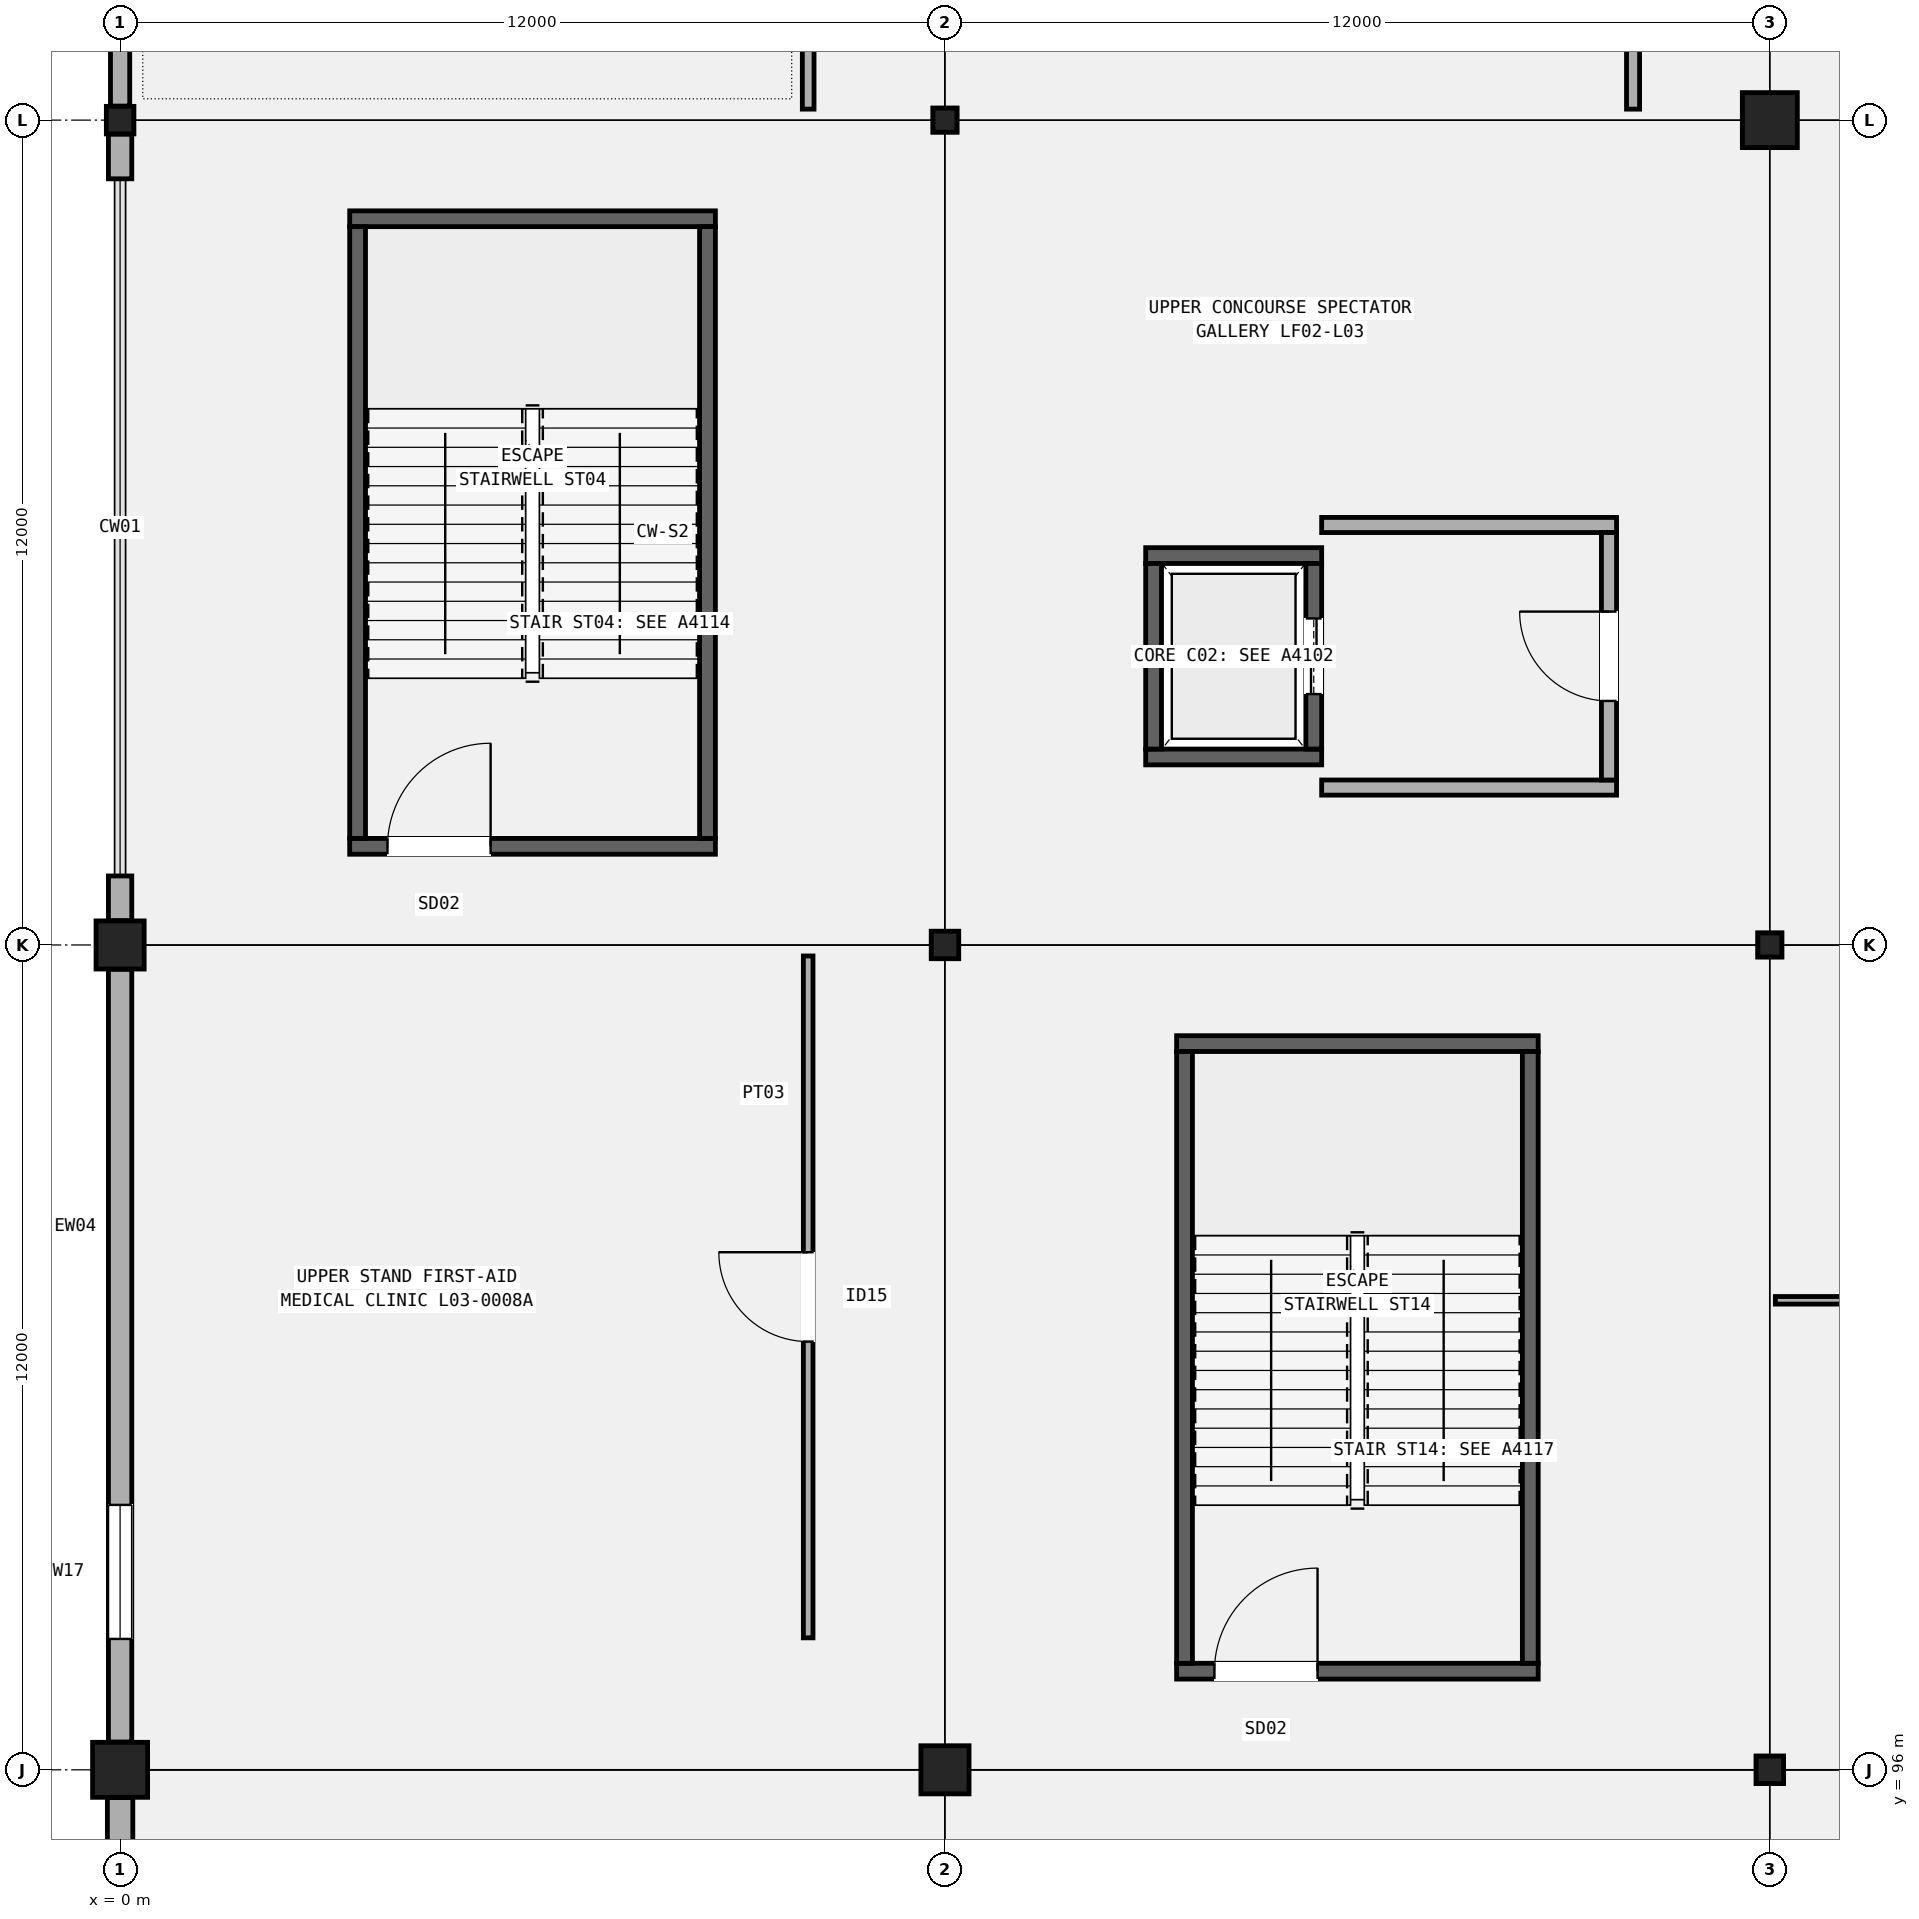
"""IFC4 building model, lengths in metres.
Left out: names, types, materials, properties, quantities, classifications, styles, units other than length and angle.
Written with IfcOpenShell. Run it as: python <this file> out.ifc"""

import sys

from ifc_helpers import new_model, si_unit, direction, frame, frame_2d, origin, origin_2d, place, context, subcontext, project, spatial, rectangle, hollow_rectangle, extrude, element, fill, save


model = new_model("IFC4")
c1 = context("Model", 3, precision=1e-05, world=origin(), true_north=direction((0.0, 1.0)))
c2 = subcontext(c1, "Body", "Model", "MODEL_VIEW")
j1 = project(units=[si_unit("LENGTHUNIT", "METRE"), si_unit("PLANEANGLEUNIT", "RADIAN")], contexts=[c1])
p1 = place(None, origin())
s1 = spatial("IfcSite", under=j1, at=p1, CompositionType="ELEMENT")
p2 = place(p1, origin())
s2 = spatial("IfcBuilding", under=s1, at=p2, CompositionType="ELEMENT")
p3 = place(p2, frame((0.0, 0.0, 15.3)))
s3 = spatial("IfcBuildingStorey", under=s2, at=p3, CompositionType="ELEMENT", Elevation=15.3)
p4 = place(p3, frame((0.0, 96.0, 0.0), z_axis=(0.0, 0.0, 1.0), x_axis=(1.0, 0.0, 0.0)))
e1 = element("IfcColumn", 1, at=p4, inside=s3, PredefinedType="COLUMN", context=c2, shape_type="SweptSolid", body=[
    extrude(rectangle(XDim=0.8, YDim=0.8, at=origin_2d()), origin(), (0.0, 0.0, 1.0), 5.1),
])
p5 = place(p3, frame((0.0, 108.0, 0.0), z_axis=(0.0, 0.0, 1.0), x_axis=(1.0, 0.0, 0.0)))
e2 = element("IfcColumn", 2, at=p5, inside=s3, PredefinedType="COLUMN", context=c2, shape_type="SweptSolid", body=[
    extrude(rectangle(XDim=0.7, YDim=0.7, at=origin_2d()), origin(), (0.0, 0.0, 1.0), 5.1),
])
p6 = place(p3, frame((0.0, 120.0, 0.0), z_axis=(0.0, 0.0, 1.0), x_axis=(1.0, 0.0, 0.0)))
e3 = element("IfcColumn", 3, at=p6, inside=s3, PredefinedType="COLUMN", context=c2, shape_type="SweptSolid", body=[
    extrude(hollow_rectangle(XDim=0.4, YDim=0.4, WallThickness=0.016, InnerFilletRadius=0.016, OuterFilletRadius=0.032, at=origin_2d()), origin(), (0.0, 0.0, 1.0), 5.1),
])
p7 = place(p3, frame((12.0, 96.0, 0.0), z_axis=(0.0, 0.0, 1.0), x_axis=(1.0, 0.0, 0.0)))
e4 = element("IfcColumn", 4, at=p7, inside=s3, PredefinedType="COLUMN", context=c2, shape_type="SweptSolid", body=[
    extrude(rectangle(XDim=0.7, YDim=0.7, at=origin_2d()), origin(), (0.0, 0.0, 1.0), 5.1),
])
p8 = place(p3, frame((12.0, 108.0, 0.0), z_axis=(0.0, 0.0, 1.0), x_axis=(1.0, 0.0, 0.0)))
e5 = element("IfcColumn", 5, at=p8, inside=s3, PredefinedType="COLUMN", context=c2, shape_type="SweptSolid", body=[
    extrude(hollow_rectangle(XDim=0.4, YDim=0.4, WallThickness=0.016, InnerFilletRadius=0.016, OuterFilletRadius=0.032, at=origin_2d()), origin(), (0.0, 0.0, 1.0), 5.1),
])
p9 = place(p3, frame((12.0, 120.0, 0.0), z_axis=(0.0, 0.0, 1.0), x_axis=(1.0, 0.0, 0.0)))
e6 = element("IfcColumn", 6, at=p9, inside=s3, PredefinedType="COLUMN", context=c2, shape_type="SweptSolid", body=[
    extrude(hollow_rectangle(XDim=0.35, YDim=0.35, WallThickness=0.016, InnerFilletRadius=0.016, OuterFilletRadius=0.032, at=origin_2d()), origin(), (0.0, 0.0, 1.0), 5.1),
])
p10 = place(p3, frame((24.0, 96.0, 0.0), z_axis=(0.0, 0.0, 1.0), x_axis=(1.0, 0.0, 0.0)))
e7 = element("IfcColumn", 7, at=p10, inside=s3, PredefinedType="COLUMN", context=c2, shape_type="SweptSolid", body=[
    extrude(hollow_rectangle(XDim=0.4, YDim=0.4, WallThickness=0.016, InnerFilletRadius=0.016, OuterFilletRadius=0.032, at=origin_2d()), origin(), (0.0, 0.0, 1.0), 5.1),
])
p11 = place(p3, frame((24.0, 108.0, 0.0), z_axis=(0.0, 0.0, 1.0), x_axis=(1.0, 0.0, 0.0)))
e8 = element("IfcColumn", 8, at=p11, inside=s3, PredefinedType="COLUMN", context=c2, shape_type="SweptSolid", body=[
    extrude(hollow_rectangle(XDim=0.35, YDim=0.35, WallThickness=0.016, InnerFilletRadius=0.016, OuterFilletRadius=0.032, at=origin_2d()), origin(), (0.0, 0.0, 1.0), 5.1),
])
p12 = place(p3, frame((24.0, 120.0, 0.0), z_axis=(0.0, 0.0, 1.0), x_axis=(1.0, 0.0, 0.0)))
e9 = element("IfcColumn", 9, at=p12, inside=s3, PredefinedType="COLUMN", context=c2, shape_type="SweptSolid", body=[
    extrude(rectangle(XDim=0.8, YDim=0.8, at=origin_2d()), origin(), (0.0, 0.0, 1.0), 5.1),
])
p13 = place(p3, frame((0.0, 84.179, 0.0), z_axis=(0.0, 0.0, 1.0), x_axis=(0.0, 1.0, 0.0)))
e10 = element("IfcWall", 10, at=p13, inside=s3, PredefinedType="SOLIDWALL", context=c2, shape_type="SweptSolid", body=[
    extrude(rectangle(XDim=11.417, YDim=0.37, at=frame_2d((5.708, 0.0))), origin(), (0.0, 0.0, 1.0), 4.16),
])
p14 = place(p13, frame((2.75, 0.0, 0.95)))
e11 = element("IfcOpeningElement", 11, at=p14, cuts=e10, PredefinedType="OPENING", context=c2, shape_type="SweptSolid", body=[
    extrude(rectangle(XDim=1.95, YDim=1.9, at=frame_2d((0.975, 0.95))), frame((0.0, 0.195, 0.0), z_axis=(0.0, -1.0, 0.0), x_axis=(1.0, 0.0, 0.0)), (0.0, 0.0, 1.0), 0.39),
])
p15 = place(p3, frame((0.0, 96.404, 0.0), z_axis=(0.0, 0.0, 1.0), x_axis=(0.0, 1.0, 0.0)))
e12 = element("IfcWall", 12, at=p15, inside=s3, PredefinedType="SOLIDWALL", context=c2, shape_type="SweptSolid", body=[
    extrude(rectangle(XDim=11.242, YDim=0.34, at=frame_2d((5.621, 0.0))), origin(), (0.0, 0.0, 1.0), 4.172),
])
p16 = place(p15, frame((1.5, 0.0, 0.95)))
e13 = element("IfcOpeningElement", 13, at=p16, cuts=e12, PredefinedType="OPENING", context=c2, shape_type="SweptSolid", body=[
    extrude(rectangle(XDim=1.95, YDim=2.35, at=frame_2d((0.975, 1.175))), frame((0.0, 0.18, 0.0), z_axis=(0.0, -1.0, 0.0), x_axis=(1.0, 0.0, 0.0)), (0.0, 0.0, 1.0), 0.36),
])
for number, where, z_axis, x_axis in (
    (14, (0.0, 108.354, 0.0), (0.0, 0.0, 1.0), (0.0, 1.0, 0.0)),
    (15, (0.0, 119.146, 0.0), (0.0, 0.0, 1.0), (0.0, 1.0, 0.0)),
):
    element("IfcWall", number, at=place(p3, frame(where, z_axis=z_axis, x_axis=x_axis)), inside=s3, PredefinedType="SOLIDWALL", context=c2, shape_type="SweptSolid", body=[
        extrude(rectangle(XDim=0.65, YDim=0.34, at=frame_2d((0.325, 0.0))), origin(), (0.0, 0.0, 1.0), 4.06),
    ])
p17 = place(p3, frame((0.0, 120.204, 0.0), z_axis=(0.0, 0.0, 1.0), x_axis=(0.0, 1.0, 0.0)))
e16 = element("IfcWall", 16, at=p17, inside=s3, PredefinedType="SOLIDWALL", context=c2, shape_type="SweptSolid", body=[
    extrude(rectangle(XDim=11.617, YDim=0.28, at=frame_2d((5.809, 0.0))), origin(), (0.0, 0.0, 1.0), 4.16),
])
p18 = place(p17, frame((1.5, 0.0, 0.95)))
e17 = element("IfcOpeningElement", 17, at=p18, cuts=e16, PredefinedType="OPENING", context=c2, shape_type="SweptSolid", body=[
    extrude(rectangle(XDim=2.1, YDim=1.85, at=frame_2d((1.05, 0.925))), frame((0.0, 0.15, 0.0), z_axis=(0.0, -1.0, 0.0), x_axis=(1.0, 0.0, 0.0)), (0.0, 0.0, 1.0), 0.3),
])
p19 = place(p3, frame((3.34, 109.435, 0.0), z_axis=(0.0, 0.0, 1.0), x_axis=(1.0, 0.0, 0.0)))
e18 = element("IfcWall", 18, at=p19, inside=s3, PredefinedType="SHEAR", context=c2, shape_type="SweptSolid", body=[
    extrude(rectangle(XDim=5.32, YDim=0.23, at=frame_2d((2.66, 0.0))), origin(), (0.0, 0.0, 1.0), 4.86),
])
p20 = place(p19, frame((0.55, 0.0, 0.0)))
e19 = element("IfcOpeningElement", 19, at=p20, cuts=e18, PredefinedType="OPENING", context=c2, shape_type="SweptSolid", body=[
    extrude(rectangle(XDim=1.5, YDim=2.2, at=frame_2d((0.75, 1.1))), frame((0.0, 0.125, 0.0), z_axis=(0.0, -1.0, 0.0), x_axis=(1.0, 0.0, 0.0)), (0.0, 0.0, 1.0), 0.25),
])
p21 = place(p3, frame((3.34, 118.565, 0.0), z_axis=(0.0, 0.0, 1.0), x_axis=(1.0, 0.0, 0.0)))
e20 = element("IfcWall", 20, at=p21, inside=s3, PredefinedType="SHEAR", context=c2, shape_type="SweptSolid", body=[
    extrude(rectangle(XDim=5.32, YDim=0.23, at=frame_2d((2.66, 0.0))), origin(), (0.0, 0.0, 1.0), 4.86),
])
for number, where, z_axis, x_axis in (
    (21, (3.455, 109.55, 0.0), (0.0, 0.0, 1.0), (0.0, 1.0, 0.0)),
    (22, (8.545, 109.55, 0.0), (0.0, 0.0, 1.0), (0.0, 1.0, 0.0)),
):
    element("IfcWall", number, at=place(p3, frame(where, z_axis=z_axis, x_axis=x_axis)), inside=s3, PredefinedType="SHEAR", context=c2, shape_type="SweptSolid", body=[
        extrude(rectangle(XDim=8.9, YDim=0.23, at=frame_2d((4.45, 0.0))), origin(), (0.0, 0.0, 1.0), 4.86),
    ])
p22 = place(p3, frame((15.37, 97.435, 0.0), z_axis=(0.0, 0.0, 1.0), x_axis=(1.0, 0.0, 0.0)))
e23 = element("IfcWall", 23, at=p22, inside=s3, PredefinedType="SHEAR", context=c2, shape_type="SweptSolid", body=[
    extrude(rectangle(XDim=5.26, YDim=0.23, at=frame_2d((2.63, 0.0))), origin(), (0.0, 0.0, 1.0), 4.86),
])
p23 = place(p22, frame((0.55, 0.0, 0.0)))
e24 = element("IfcOpeningElement", 24, at=p23, cuts=e23, PredefinedType="OPENING", context=c2, shape_type="SweptSolid", body=[
    extrude(rectangle(XDim=1.5, YDim=2.2, at=frame_2d((0.75, 1.1))), frame((0.0, 0.125, 0.0), z_axis=(0.0, -1.0, 0.0), x_axis=(1.0, 0.0, 0.0)), (0.0, 0.0, 1.0), 0.25),
])
p24 = place(p3, frame((15.37, 106.565, 0.0), z_axis=(0.0, 0.0, 1.0), x_axis=(1.0, 0.0, 0.0)))
e25 = element("IfcWall", 25, at=p24, inside=s3, PredefinedType="SHEAR", context=c2, shape_type="SweptSolid", body=[
    extrude(rectangle(XDim=5.26, YDim=0.23, at=frame_2d((2.63, 0.0))), origin(), (0.0, 0.0, 1.0), 4.86),
])
for number, where, z_axis, x_axis in (
    (26, (15.485, 97.55, 0.0), (0.0, 0.0, 1.0), (0.0, 1.0, 0.0)),
    (27, (20.515, 97.55, 0.0), (0.0, 0.0, 1.0), (0.0, 1.0, 0.0)),
):
    element("IfcWall", number, at=place(p3, frame(where, z_axis=z_axis, x_axis=x_axis)), inside=s3, PredefinedType="SHEAR", context=c2, shape_type="SweptSolid", body=[
        extrude(rectangle(XDim=8.9, YDim=0.23, at=frame_2d((4.45, 0.0))), origin(), (0.0, 0.0, 1.0), 4.86),
    ])
for number, where, z_axis, x_axis in (
    (28, (14.92, 110.735, 0.0), (0.0, 0.0, 1.0), (1.0, 0.0, 0.0)),
    (29, (14.92, 113.665, 0.0), (0.0, 0.0, 1.0), (1.0, 0.0, 0.0)),
):
    element("IfcWall", number, at=place(p3, frame(where, z_axis=z_axis, x_axis=x_axis)), inside=s3, PredefinedType="SHEAR", context=c2, shape_type="SweptSolid", body=[
        extrude(rectangle(XDim=2.56, YDim=0.23, at=frame_2d((1.28, 0.0))), origin(), (0.0, 0.0, 1.0), 4.86),
    ])
p25 = place(p3, frame((15.035, 110.85, 0.0), z_axis=(0.0, 0.0, 1.0), x_axis=(0.0, 1.0, 0.0)))
e30 = element("IfcWall", 30, at=p25, inside=s3, PredefinedType="SHEAR", context=c2, shape_type="SweptSolid", body=[
    extrude(rectangle(XDim=2.7, YDim=0.23, at=frame_2d((1.35, 0.0))), origin(), (0.0, 0.0, 1.0), 4.86),
])
p26 = place(p3, frame((17.365, 110.85, 0.0), z_axis=(0.0, 0.0, 1.0), x_axis=(0.0, 1.0, 0.0)))
e31 = element("IfcWall", 31, at=p26, inside=s3, PredefinedType="SHEAR", context=c2, shape_type="SweptSolid", body=[
    extrude(rectangle(XDim=2.7, YDim=0.23, at=frame_2d((1.35, 0.0))), origin(), (0.0, 0.0, 1.0), 4.86),
])
p27 = place(p26, frame((0.8, 0.0, 0.0)))
e32 = element("IfcOpeningElement", 32, at=p27, cuts=e31, PredefinedType="OPENING", context=c2, shape_type="SweptSolid", body=[
    extrude(rectangle(XDim=1.1, YDim=2.15, at=frame_2d((0.55, 1.075))), frame((0.0, 0.125, 0.0), z_axis=(0.0, -1.0, 0.0), x_axis=(1.0, 0.0, 0.0)), (0.0, 0.0, 1.0), 0.25),
])
for number, where, z_axis, x_axis in (
    (33, (17.48, 110.29, 0.0), (0.0, 0.0, 1.0), (1.0, 0.0, 0.0)),
    (34, (17.48, 114.11, 0.0), (0.0, 0.0, 1.0), (1.0, 0.0, 0.0)),
):
    element("IfcWall", number, at=place(p3, frame(where, z_axis=z_axis, x_axis=x_axis)), inside=s3, PredefinedType="SOLIDWALL", context=c2, shape_type="SweptSolid", body=[
        extrude(rectangle(XDim=4.29, YDim=0.22, at=frame_2d((2.145, 0.0))), origin(), (0.0, 0.0, 1.0), 4.22),
    ])
p28 = place(p3, frame((21.66, 110.4, 0.0), z_axis=(0.0, 0.0, 1.0), x_axis=(0.0, 1.0, 0.0)))
e35 = element("IfcWall", 35, at=p28, inside=s3, PredefinedType="SOLIDWALL", context=c2, shape_type="SweptSolid", body=[
    extrude(rectangle(XDim=3.6, YDim=0.22, at=frame_2d((1.8, 0.0))), origin(), (0.0, 0.0, 1.0), 4.22),
])
p29 = place(p28, frame((1.15, 0.0, 0.0)))
e36 = element("IfcOpeningElement", 36, at=p29, cuts=e35, PredefinedType="OPENING", context=c2, shape_type="SweptSolid", body=[
    extrude(rectangle(XDim=1.3, YDim=2.15, at=frame_2d((0.65, 1.075))), frame((0.0, 0.12, 0.0), z_axis=(0.0, -1.0, 0.0), x_axis=(1.0, 0.0, 0.0)), (0.0, 0.0, 1.0), 0.24),
])
p30 = place(p3, frame((10.01, 97.92, 0.0), z_axis=(0.0, 0.0, 1.0), x_axis=(0.0, 1.0, 0.0)))
e37 = element("IfcWall", 37, at=p30, inside=s3, PredefinedType="PARTITIONING", context=c2, shape_type="SweptSolid", body=[
    extrude(rectangle(XDim=9.92, YDim=0.14, at=frame_2d((4.96, 0.0))), origin(), (0.0, 0.0, 1.0), 4.22),
])
p31 = place(p30, frame((4.31, 0.0, 0.0)))
e38 = element("IfcOpeningElement", 38, at=p31, cuts=e37, PredefinedType="OPENING", context=c2, shape_type="SweptSolid", body=[
    extrude(rectangle(XDim=1.3, YDim=2.24, at=frame_2d((0.65, 1.12))), frame((0.0, 0.08, 0.0), z_axis=(0.0, -1.0, 0.0), x_axis=(1.0, 0.0, 0.0)), (0.0, 0.0, 1.0), 0.16),
])
p32 = place(p3, frame((10.01, 120.16, 0.0), z_axis=(0.0, 0.0, 1.0), x_axis=(0.0, 1.0, 0.0)))
e39 = element("IfcWall", 39, at=p32, inside=s3, PredefinedType="PARTITIONING", context=c2, shape_type="SweptSolid", body=[
    extrude(rectangle(XDim=11.68, YDim=0.17, at=frame_2d((5.84, 0.0))), origin(), (0.0, 0.0, 1.0), 4.22),
])
p33 = place(p32, frame((5.175, 0.0, 0.0)))
e40 = element("IfcOpeningElement", 40, at=p33, cuts=e39, PredefinedType="OPENING", context=c2, shape_type="SweptSolid", body=[
    extrude(rectangle(XDim=1.33, YDim=2.22, at=frame_2d((0.665, 1.11))), frame((0.0, 0.095, 0.0), z_axis=(0.0, -1.0, 0.0), x_axis=(1.0, 0.0, 0.0)), (0.0, 0.0, 1.0), 0.19),
])
p34 = place(p3, frame((22.01, 120.16, 0.0), z_axis=(0.0, 0.0, 1.0), x_axis=(0.0, 1.0, 0.0)))
e41 = element("IfcWall", 41, at=p34, inside=s3, PredefinedType="PARTITIONING", context=c2, shape_type="SweptSolid", body=[
    extrude(rectangle(XDim=11.68, YDim=0.19, at=frame_2d((5.84, 0.0))), origin(), (0.0, 0.0, 1.0), 4.22),
])
p35 = place(p34, frame((5.1, 0.0, 0.0)))
e42 = element("IfcOpeningElement", 42, at=p35, cuts=e41, PredefinedType="OPENING", context=c2, shape_type="SweptSolid", body=[
    extrude(rectangle(XDim=1.48, YDim=2.24, at=frame_2d((0.74, 1.12))), frame((0.0, 0.105, 0.0), z_axis=(0.0, -1.0, 0.0), x_axis=(1.0, 0.0, 0.0)), (0.0, 0.0, 1.0), 0.21),
])
p36 = place(p3, frame((24.08, 102.83, 0.0), z_axis=(0.0, 0.0, 1.0), x_axis=(1.0, 0.0, 0.0)))
e43 = element("IfcWall", 43, at=p36, inside=s3, PredefinedType="PARTITIONING", context=c2, shape_type="SweptSolid", body=[
    extrude(rectangle(XDim=10.33, YDim=0.11, at=frame_2d((5.165, 0.0))), origin(), (0.0, 0.0, 1.0), 4.22),
])
p37 = place(p16, origin())
e44 = element("IfcWindow", 44, at=p37, inside=s3, PartitioningType="SINGLE_PANEL", PredefinedType="WINDOW", context=c2, shape_type="SweptSolid", body=[
    extrude(rectangle(XDim=1.95, YDim=2.35, at=frame_2d((0.975, 1.175))), frame((0.0, 0.03, 0.0), z_axis=(0.0, -1.0, 0.0), x_axis=(1.0, 0.0, 0.0)), (0.0, 0.0, 1.0), 0.06),
])
fill(e13, e44)
p38 = place(p20, origin())
e45 = element("IfcDoor", 45, at=p38, inside=s3, OperationType="SINGLE_SWING_RIGHT", PredefinedType="DOOR", context=c2, shape_type="SweptSolid", body=[
    extrude(rectangle(XDim=1.5, YDim=2.2, at=frame_2d((0.75, 1.1))), frame((0.0, 0.025, 0.0), z_axis=(0.0, -1.0, 0.0), x_axis=(1.0, 0.0, 0.0)), (0.0, 0.0, 1.0), 0.05),
])
fill(e19, e45)
p39 = place(p23, origin())
e46 = element("IfcDoor", 46, at=p39, inside=s3, OperationType="SINGLE_SWING_RIGHT", PredefinedType="DOOR", context=c2, shape_type="SweptSolid", body=[
    extrude(rectangle(XDim=1.5, YDim=2.2, at=frame_2d((0.75, 1.1))), frame((0.0, 0.025, 0.0), z_axis=(0.0, -1.0, 0.0), x_axis=(1.0, 0.0, 0.0)), (0.0, 0.0, 1.0), 0.05),
])
fill(e24, e46)
p40 = place(p27, origin())
e47 = element("IfcDoor", 47, at=p40, inside=s3, OperationType="DOUBLE_DOOR_SLIDING", PredefinedType="DOOR", context=c2, shape_type="SweptSolid", body=[
    extrude(rectangle(XDim=1.1, YDim=2.15, at=frame_2d((0.55, 1.075))), frame((0.0, 0.025, 0.0), z_axis=(0.0, -1.0, 0.0), x_axis=(1.0, 0.0, 0.0)), (0.0, 0.0, 1.0), 0.05),
])
fill(e32, e47)
p41 = place(p29, origin())
e48 = element("IfcDoor", 48, at=p41, inside=s3, OperationType="SINGLE_SWING_RIGHT", PredefinedType="DOOR", context=c2, shape_type="SweptSolid", body=[
    extrude(rectangle(XDim=1.3, YDim=2.15, at=frame_2d((0.65, 1.075))), frame((0.0, 0.025, 0.0), z_axis=(0.0, -1.0, 0.0), x_axis=(1.0, 0.0, 0.0)), (0.0, 0.0, 1.0), 0.05),
])
fill(e36, e48)
p42 = place(p31, origin())
e49 = element("IfcDoor", 49, at=p42, inside=s3, OperationType="SINGLE_SWING_RIGHT", PredefinedType="DOOR", context=c2, shape_type="SweptSolid", body=[
    extrude(rectangle(XDim=1.3, YDim=2.24, at=frame_2d((0.65, 1.12))), frame((0.0, 0.025, 0.0), z_axis=(0.0, -1.0, 0.0), x_axis=(1.0, 0.0, 0.0)), (0.0, 0.0, 1.0), 0.05),
])
fill(e38, e49)
save(model, sys.argv[1])
